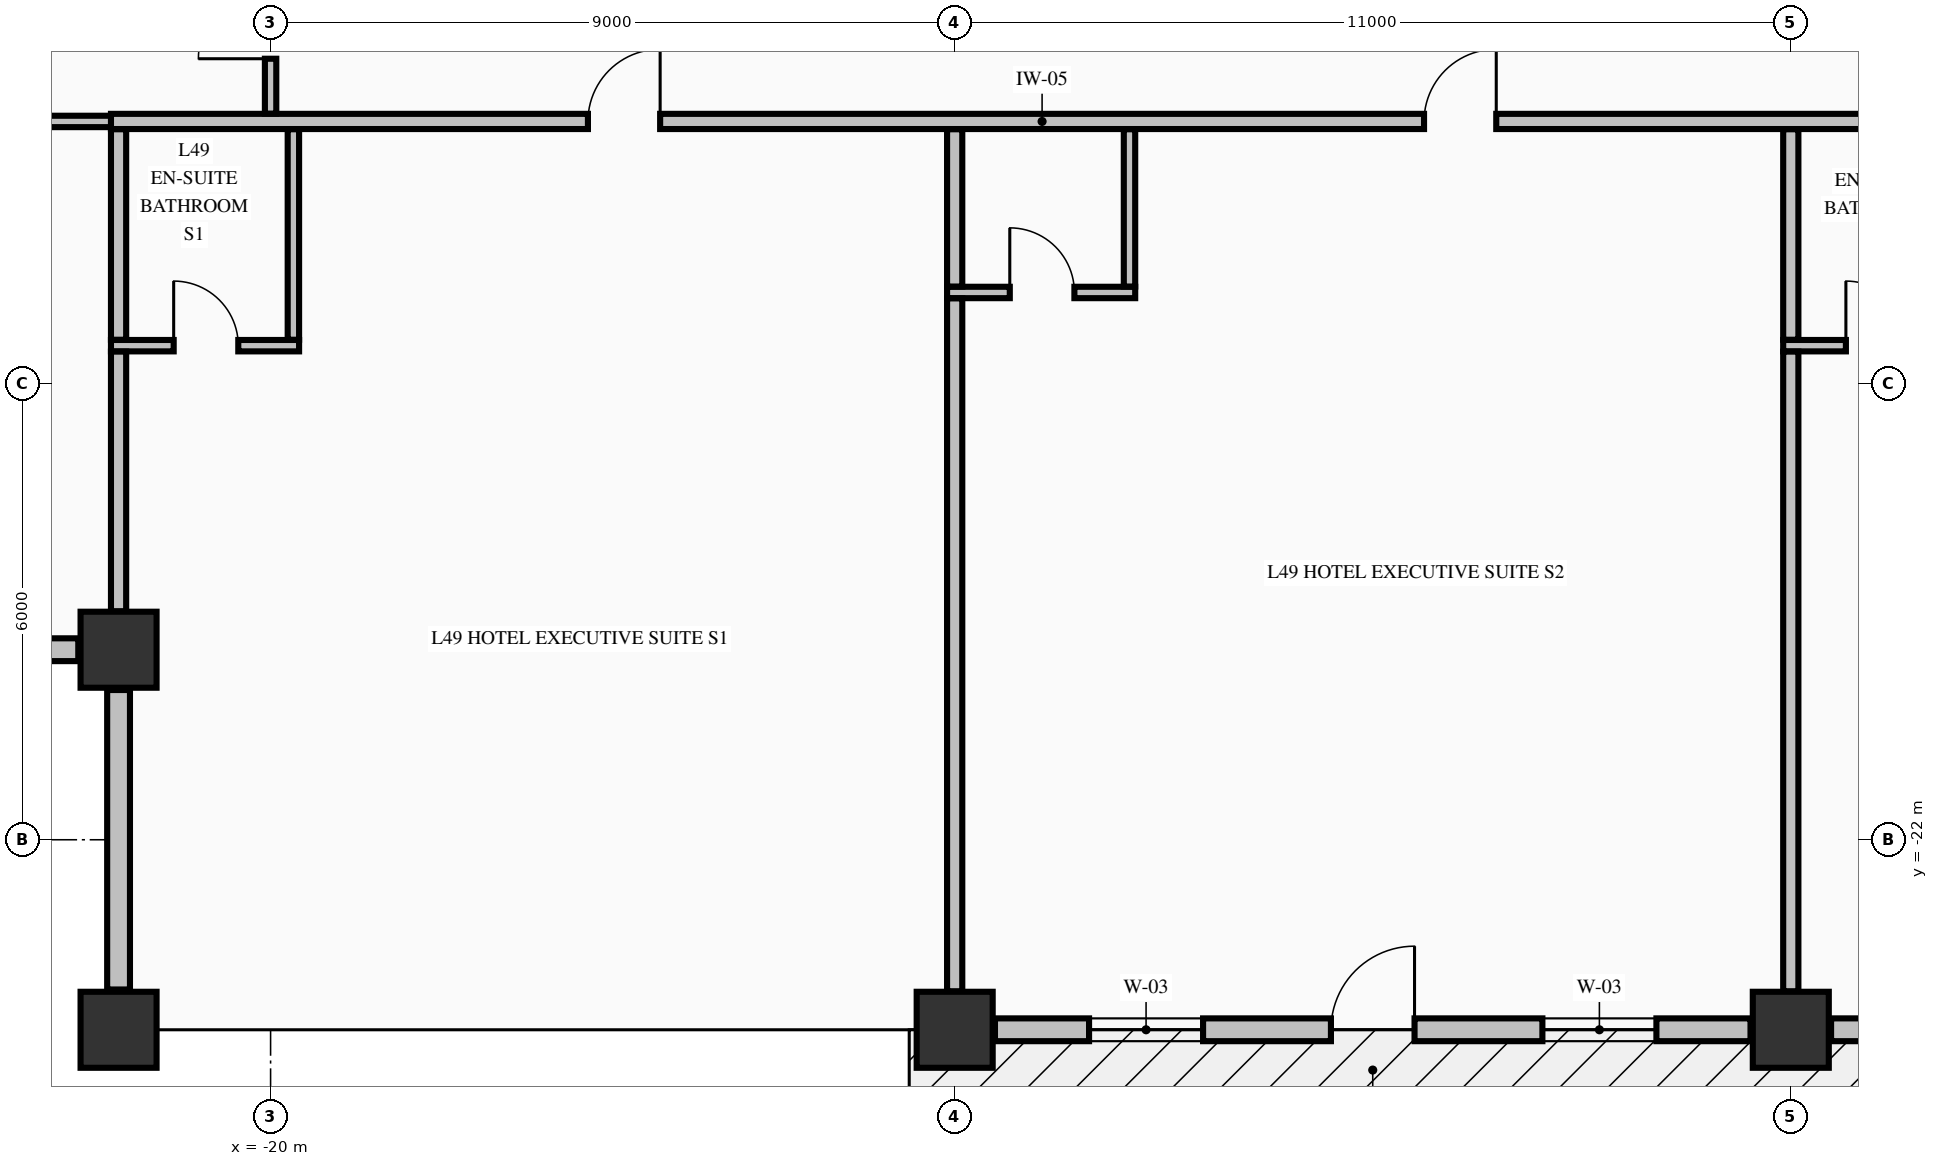
"""IFC4 building model, lengths in metres.
Left out: names, types, materials, properties, quantities, classifications, styles, units other than length and angle.
Written with IfcOpenShell. Run it as: python <this file> out.ifc"""

import sys

from ifc_helpers import new_model, si_unit, direction, frame, frame_2d, origin, origin_2d, place, context, subcontext, project, spatial, rectangle, extrude, element, fill, save


model = new_model("IFC4")
c1 = context("Model", 3, precision=1e-05, world=origin(), true_north=direction((0.0, 1.0)))
c2 = subcontext(c1, "Body", "Model", "MODEL_VIEW")
j1 = project(units=[si_unit("LENGTHUNIT", "METRE"), si_unit("PLANEANGLEUNIT", "RADIAN")], contexts=[c1])
p1 = place(None, origin())
s1 = spatial("IfcSite", under=j1, at=p1, CompositionType="ELEMENT")
p2 = place(p1, origin())
s2 = spatial("IfcBuilding", under=s1, at=p2, CompositionType="ELEMENT")
p3 = place(p2, frame((0.0, 0.0, 191.46)))
s3 = spatial("IfcBuildingStorey", under=s2, at=p3, CompositionType="ELEMENT", Elevation=191.46)
for number, where, z_axis, x_axis in (
    (1, (-22.0, -24.5, -0.425), (0.0, 0.0, 1.0), (1.0, 0.0, 0.0)),
    (2, (-11.0, -24.5, -0.425), (0.0, 0.0, 1.0), (1.0, 0.0, 0.0)),
    (3, (0.0, -24.5, -0.425), (0.0, 0.0, 1.0), (1.0, 0.0, 0.0)),
    (4, (-22.0, -19.5, -0.425), (0.0, 0.0, 1.0), (1.0, 0.0, 0.0)),
):
    element("IfcColumn", number, at=place(p3, frame(where, z_axis=z_axis, x_axis=x_axis)), inside=s3, PredefinedType="COLUMN", context=c2, shape_type="SweptSolid", body=[
        extrude(rectangle(XDim=1.0, YDim=1.0, at=origin_2d()), origin(), (0.0, 0.0, 1.0), 3.55),
    ])
for number, where, z_axis, x_axis in (
    (5, (-26.47, -19.5, 0.0), (0.0, 0.0, 1.0), (1.0, 0.0, 0.0)),
    (6, (-22.0, -20.03, 0.0), (0.0, 0.0, 1.0), (0.0, -1.0, 0.0)),
):
    element("IfcWall", number, at=place(p3, frame(where, z_axis=z_axis, x_axis=x_axis)), inside=s3, PredefinedType="STANDARD", context=c2, shape_type="SweptSolid", body=[
        extrude(rectangle(XDim=3.94, YDim=0.3, at=frame_2d((1.97, 0.0))), origin(), (0.0, 0.0, 1.0), 1.317),
    ])
p4 = place(p3, frame((-10.47, -24.5, 0.0), z_axis=(0.0, 0.0, 1.0), x_axis=(1.0, 0.0, 0.0)))
e7 = element("IfcWall", 7, at=p4, inside=s3, PredefinedType="STANDARD", context=c2, shape_type="SweptSolid", body=[
    extrude(rectangle(XDim=9.94, YDim=0.3, at=frame_2d((4.97, 0.0))), origin(), (0.0, 0.0, 1.0), 2.517),
])
p5 = place(p4, frame((4.42, 0.0, 0.0)))
e8 = element("IfcOpeningElement", 8, at=p5, cuts=e7, PredefinedType="OPENING", context=c2, shape_type="SweptSolid", body=[
    extrude(rectangle(XDim=1.1, YDim=2.15, at=frame_2d((0.55, 1.075))), frame((0.0, 0.16, 0.0), z_axis=(0.0, -1.0, 0.0), x_axis=(1.0, 0.0, 0.0)), (0.0, 0.0, 1.0), 0.32),
])
p6 = place(p4, frame((1.238, 0.0, 0.72)))
e9 = element("IfcOpeningElement", 9, at=p6, cuts=e7, PredefinedType="OPENING", context=c2, shape_type="SweptSolid", body=[
    extrude(rectangle(XDim=1.5, YDim=1.6, at=frame_2d((0.75, 0.8))), frame((0.0, 0.16, 0.0), z_axis=(0.0, -1.0, 0.0), x_axis=(1.0, 0.0, 0.0)), (0.0, 0.0, 1.0), 0.32),
])
p7 = place(p4, frame((7.202, 0.0, 0.72)))
e10 = element("IfcOpeningElement", 10, at=p7, cuts=e7, PredefinedType="OPENING", context=c2, shape_type="SweptSolid", body=[
    extrude(rectangle(XDim=1.5, YDim=1.6, at=frame_2d((0.75, 0.8))), frame((0.0, 0.16, 0.0), z_axis=(0.0, -1.0, 0.0), x_axis=(1.0, 0.0, 0.0)), (0.0, 0.0, 1.0), 0.32),
])
p8 = place(p3, frame((0.53, -24.5, 0.0), z_axis=(0.0, 0.0, 1.0), x_axis=(1.0, 0.0, 0.0)))
e11 = element("IfcWall", 11, at=p8, inside=s3, PredefinedType="STANDARD", context=c2, shape_type="SweptSolid", body=[
    extrude(rectangle(XDim=9.94, YDim=0.3, at=frame_2d((4.97, 0.0))), origin(), (0.0, 0.0, 1.0), 2.517),
])
p9 = place(p8, frame((1.238, 0.0, 0.72)))
e12 = element("IfcOpeningElement", 12, at=p9, cuts=e11, PredefinedType="OPENING", context=c2, shape_type="SweptSolid", body=[
    extrude(rectangle(XDim=1.5, YDim=1.6, at=frame_2d((0.75, 0.8))), frame((0.0, 0.16, 0.0), z_axis=(0.0, -1.0, 0.0), x_axis=(1.0, 0.0, 0.0)), (0.0, 0.0, 1.0), 0.32),
])
p10 = place(p8, frame((3.226, 0.0, 0.72)))
e13 = element("IfcOpeningElement", 13, at=p10, cuts=e11, PredefinedType="OPENING", context=c2, shape_type="SweptSolid", body=[
    extrude(rectangle(XDim=1.5, YDim=1.6, at=frame_2d((0.75, 0.8))), frame((0.0, 0.16, 0.0), z_axis=(0.0, -1.0, 0.0), x_axis=(1.0, 0.0, 0.0)), (0.0, 0.0, 1.0), 0.32),
])
p11 = place(p8, frame((5.214, 0.0, 0.72)))
e14 = element("IfcOpeningElement", 14, at=p11, cuts=e11, PredefinedType="OPENING", context=c2, shape_type="SweptSolid", body=[
    extrude(rectangle(XDim=1.5, YDim=1.6, at=frame_2d((0.75, 0.8))), frame((0.0, 0.16, 0.0), z_axis=(0.0, -1.0, 0.0), x_axis=(1.0, 0.0, 0.0)), (0.0, 0.0, 1.0), 0.32),
])
p12 = place(p3, frame((-22.1, -15.5, 0.0), z_axis=(0.0, 0.0, 1.0), x_axis=(1.0, 0.0, 0.0)))
e15 = element("IfcWall", 15, at=p12, inside=s3, PredefinedType="PARTITIONING", context=c2, shape_type="SweptSolid", body=[
    extrude(rectangle(XDim=2.475, YDim=0.15, at=frame_2d((1.238, 0.0))), origin(), (0.0, 0.0, 1.0), 3.125),
])
p13 = place(p12, frame((0.825, 0.0, 0.0)))
e16 = element("IfcOpeningElement", 16, at=p13, cuts=e15, PredefinedType="OPENING", context=c2, shape_type="SweptSolid", body=[
    extrude(rectangle(XDim=0.85, YDim=2.1, at=frame_2d((0.425, 1.05))), frame((0.0, 0.085, 0.0), z_axis=(0.0, -1.0, 0.0), x_axis=(1.0, 0.0, 0.0)), (0.0, 0.0, 1.0), 0.17),
])
p14 = place(p3, frame((-0.1, -15.5, 0.0), z_axis=(0.0, 0.0, 1.0), x_axis=(1.0, 0.0, 0.0)))
e17 = element("IfcWall", 17, at=p14, inside=s3, PredefinedType="PARTITIONING", context=c2, shape_type="SweptSolid", body=[
    extrude(rectangle(XDim=2.475, YDim=0.15, at=frame_2d((1.238, 0.0))), origin(), (0.0, 0.0, 1.0), 3.125),
])
p15 = place(p14, frame((0.825, 0.0, 0.0)))
e18 = element("IfcOpeningElement", 18, at=p15, cuts=e17, PredefinedType="OPENING", context=c2, shape_type="SweptSolid", body=[
    extrude(rectangle(XDim=0.85, YDim=2.1, at=frame_2d((0.425, 1.05))), frame((0.0, 0.085, 0.0), z_axis=(0.0, -1.0, 0.0), x_axis=(1.0, 0.0, 0.0)), (0.0, 0.0, 1.0), 0.17),
])
p16 = place(p3, frame((-11.1, -14.8, 0.0), z_axis=(0.0, 0.0, 1.0), x_axis=(1.0, 0.0, 0.0)))
e19 = element("IfcWall", 19, at=p16, inside=s3, PredefinedType="PARTITIONING", context=c2, shape_type="SweptSolid", body=[
    extrude(rectangle(XDim=2.475, YDim=0.15, at=frame_2d((1.238, 0.0))), origin(), (0.0, 0.0, 1.0), 3.125),
])
p17 = place(p16, frame((0.825, 0.0, 0.0)))
e20 = element("IfcOpeningElement", 20, at=p17, cuts=e19, PredefinedType="OPENING", context=c2, shape_type="SweptSolid", body=[
    extrude(rectangle(XDim=0.85, YDim=2.1, at=frame_2d((0.425, 1.05))), frame((0.0, 0.085, 0.0), z_axis=(0.0, -1.0, 0.0), x_axis=(1.0, 0.0, 0.0)), (0.0, 0.0, 1.0), 0.17),
])
p18 = place(p3, frame((-26.835, -12.55, 0.0), z_axis=(0.0, 0.0, 1.0), x_axis=(1.0, 0.0, 0.0)))
e21 = element("IfcWall", 21, at=p18, inside=s3, PredefinedType="PARTITIONING", context=c2, shape_type="SweptSolid", body=[
    extrude(rectangle(XDim=4.935, YDim=0.15, at=frame_2d((2.468, 0.0))), origin(), (0.0, 0.0, 1.0), 3.125),
])
p19 = place(p3, frame((-22.1, -12.55, 0.0), z_axis=(0.0, 0.0, 1.0), x_axis=(1.0, 0.0, 0.0)))
e22 = element("IfcWall", 22, at=p19, inside=s3, PredefinedType="PARTITIONING", context=c2, shape_type="SweptSolid", body=[
    extrude(rectangle(XDim=39.2, YDim=0.2, at=frame_2d((19.6, 0.0))), origin(), (0.0, 0.0, 1.0), 3.125),
])
p20 = place(p19, frame((6.275, 0.0, 0.0)))
e23 = element("IfcOpeningElement", 23, at=p20, cuts=e22, PredefinedType="OPENING", context=c2, shape_type="SweptSolid", body=[
    extrude(rectangle(XDim=0.95, YDim=2.15, at=frame_2d((0.475, 1.075))), frame((0.0, 0.11, 0.0), z_axis=(0.0, -1.0, 0.0), x_axis=(1.0, 0.0, 0.0)), (0.0, 0.0, 1.0), 0.22),
])
p21 = place(p19, frame((17.275, 0.0, 0.0)))
e24 = element("IfcOpeningElement", 24, at=p21, cuts=e22, PredefinedType="OPENING", context=c2, shape_type="SweptSolid", body=[
    extrude(rectangle(XDim=0.95, YDim=2.15, at=frame_2d((0.475, 1.075))), frame((0.0, 0.11, 0.0), z_axis=(0.0, -1.0, 0.0), x_axis=(1.0, 0.0, 0.0)), (0.0, 0.0, 1.0), 0.22),
])
p22 = place(p19, frame((27.025, 0.0, 0.0)))
e25 = element("IfcOpeningElement", 25, at=p22, cuts=e22, PredefinedType="OPENING", context=c2, shape_type="SweptSolid", body=[
    extrude(rectangle(XDim=0.95, YDim=2.15, at=frame_2d((0.475, 1.075))), frame((0.0, 0.11, 0.0), z_axis=(0.0, -1.0, 0.0), x_axis=(1.0, 0.0, 0.0)), (0.0, 0.0, 1.0), 0.22),
])
p23 = place(p19, frame((35.525, 0.0, 0.0)))
e26 = element("IfcOpeningElement", 26, at=p23, cuts=e22, PredefinedType="OPENING", context=c2, shape_type="SweptSolid", body=[
    extrude(rectangle(XDim=0.95, YDim=2.15, at=frame_2d((0.475, 1.075))), frame((0.0, 0.11, 0.0), z_axis=(0.0, -1.0, 0.0), x_axis=(1.0, 0.0, 0.0)), (0.0, 0.0, 1.0), 0.22),
])
p24 = place(p3, frame((-22.0, -18.994, 0.0), z_axis=(0.0, 0.0, 1.0), x_axis=(0.0, 1.0, 0.0)))
e27 = element("IfcWall", 27, at=p24, inside=s3, PredefinedType="PARTITIONING", context=c2, shape_type="SweptSolid", body=[
    extrude(rectangle(XDim=3.416, YDim=0.2, at=frame_2d((1.708, 0.0))), origin(), (0.0, 0.0, 1.0), 3.125),
])
p25 = place(p3, frame((-22.0, -15.422, 0.0), z_axis=(0.0, 0.0, 1.0), x_axis=(0.0, 1.0, 0.0)))
e28 = element("IfcWall", 28, at=p25, inside=s3, PredefinedType="PARTITIONING", context=c2, shape_type="SweptSolid", body=[
    extrude(rectangle(XDim=2.769, YDim=0.2, at=frame_2d((1.385, 0.0))), origin(), (0.0, 0.0, 1.0), 3.125),
])
p26 = place(p3, frame((-20.0, -12.447, 0.0), z_axis=(0.0, 0.0, 1.0), x_axis=(0.0, 1.0, 0.0)))
e29 = element("IfcWall", 29, at=p26, inside=s3, PredefinedType="PARTITIONING", context=c2, shape_type="SweptSolid", body=[
    extrude(rectangle(XDim=2.066, YDim=0.15, at=frame_2d((1.033, 0.0))), origin(), (0.0, 0.0, 1.0), 2.317),
])
p27 = place(p26, frame((0.722, 0.0, 0.0)))
e30 = element("IfcOpeningElement", 30, at=p27, cuts=e29, PredefinedType="OPENING", context=c2, shape_type="SweptSolid", body=[
    extrude(rectangle(XDim=0.95, YDim=2.15, at=frame_2d((0.475, 1.075))), frame((0.0, 0.085, 0.0), z_axis=(0.0, -1.0, 0.0), x_axis=(1.0, 0.0, 0.0)), (0.0, 0.0, 1.0), 0.17),
])
p28 = place(p3, frame((-19.7, -15.422, 0.0), z_axis=(0.0, 0.0, 1.0), x_axis=(0.0, 1.0, 0.0)))
e31 = element("IfcWall", 31, at=p28, inside=s3, PredefinedType="PARTITIONING", context=c2, shape_type="SweptSolid", body=[
    extrude(rectangle(XDim=2.769, YDim=0.15, at=frame_2d((1.385, 0.0))), origin(), (0.0, 0.0, 1.0), 2.317),
])
p29 = place(p3, frame((-11.0, -23.994, 0.0), z_axis=(0.0, 0.0, 1.0), x_axis=(0.0, 1.0, 0.0)))
e32 = element("IfcWall", 32, at=p29, inside=s3, PredefinedType="PARTITIONING", context=c2, shape_type="SweptSolid", body=[
    extrude(rectangle(XDim=9.116, YDim=0.2, at=frame_2d((4.558, 0.0))), origin(), (0.0, 0.0, 1.0), 2.317),
])
p30 = place(p3, frame((-11.0, -14.722, 0.0), z_axis=(0.0, 0.0, 1.0), x_axis=(0.0, 1.0, 0.0)))
e33 = element("IfcWall", 33, at=p30, inside=s3, PredefinedType="PARTITIONING", context=c2, shape_type="SweptSolid", body=[
    extrude(rectangle(XDim=2.069, YDim=0.2, at=frame_2d((1.034, 0.0))), origin(), (0.0, 0.0, 1.0), 2.317),
])
p31 = place(p3, frame((-8.7, -14.722, 0.0), z_axis=(0.0, 0.0, 1.0), x_axis=(0.0, 1.0, 0.0)))
e34 = element("IfcWall", 34, at=p31, inside=s3, PredefinedType="PARTITIONING", context=c2, shape_type="SweptSolid", body=[
    extrude(rectangle(XDim=2.069, YDim=0.15, at=frame_2d((1.034, 0.0))), origin(), (0.0, 0.0, 1.0), 3.125),
])
p32 = place(p3, frame((0.0, -23.994, 0.0), z_axis=(0.0, 0.0, 1.0), x_axis=(0.0, 1.0, 0.0)))
e35 = element("IfcWall", 35, at=p32, inside=s3, PredefinedType="PARTITIONING", context=c2, shape_type="SweptSolid", body=[
    extrude(rectangle(XDim=8.416, YDim=0.2, at=frame_2d((4.208, 0.0))), origin(), (0.0, 0.0, 1.0), 2.317),
])
p33 = place(p3, frame((0.0, -15.422, 0.0), z_axis=(0.0, 0.0, 1.0), x_axis=(0.0, 1.0, 0.0)))
e36 = element("IfcWall", 36, at=p33, inside=s3, PredefinedType="PARTITIONING", context=c2, shape_type="SweptSolid", body=[
    extrude(rectangle(XDim=2.769, YDim=0.2, at=frame_2d((1.385, 0.0))), origin(), (0.0, 0.0, 1.0), 2.317),
])
p34 = place(p5, origin())
e37 = element("IfcDoor", 37, at=p34, inside=s3, OperationType="SINGLE_SWING_RIGHT", PredefinedType="DOOR", context=c2, shape_type="SweptSolid", body=[
    extrude(rectangle(XDim=1.1, YDim=2.15, at=frame_2d((0.55, 1.075))), frame((0.0, 0.025, 0.0), z_axis=(0.0, -1.0, 0.0), x_axis=(1.0, 0.0, 0.0)), (0.0, 0.0, 1.0), 0.05),
])
fill(e8, e37)
p35 = place(p6, origin())
e38 = element("IfcWindow", 38, at=p35, inside=s3, PartitioningType="SINGLE_PANEL", PredefinedType="WINDOW", context=c2, shape_type="SweptSolid", body=[
    extrude(rectangle(XDim=1.5, YDim=1.6, at=frame_2d((0.75, 0.8))), frame((0.0, 0.03, 0.0), z_axis=(0.0, -1.0, 0.0), x_axis=(1.0, 0.0, 0.0)), (0.0, 0.0, 1.0), 0.06),
])
fill(e9, e38)
p36 = place(p7, origin())
e39 = element("IfcWindow", 39, at=p36, inside=s3, PartitioningType="SINGLE_PANEL", PredefinedType="WINDOW", context=c2, shape_type="SweptSolid", body=[
    extrude(rectangle(XDim=1.5, YDim=1.6, at=frame_2d((0.75, 0.8))), frame((0.0, 0.03, 0.0), z_axis=(0.0, -1.0, 0.0), x_axis=(1.0, 0.0, 0.0)), (0.0, 0.0, 1.0), 0.06),
])
fill(e10, e39)
p37 = place(p20, origin())
e40 = element("IfcDoor", 40, at=p37, inside=s3, OperationType="SINGLE_SWING_RIGHT", PredefinedType="DOOR", context=c2, shape_type="SweptSolid", body=[
    extrude(rectangle(XDim=0.95, YDim=2.15, at=frame_2d((0.475, 1.075))), frame((0.0, 0.025, 0.0), z_axis=(0.0, -1.0, 0.0), x_axis=(1.0, 0.0, 0.0)), (0.0, 0.0, 1.0), 0.05),
])
fill(e23, e40)
p38 = place(p13, origin())
e41 = element("IfcDoor", 41, at=p38, inside=s3, OperationType="SINGLE_SWING_LEFT", PredefinedType="DOOR", context=c2, shape_type="SweptSolid", body=[
    extrude(rectangle(XDim=0.85, YDim=2.1, at=frame_2d((0.425, 1.05))), frame((0.0, 0.025, 0.0), z_axis=(0.0, -1.0, 0.0), x_axis=(1.0, 0.0, 0.0)), (0.0, 0.0, 1.0), 0.05),
])
fill(e16, e41)
p39 = place(p21, origin())
e42 = element("IfcDoor", 42, at=p39, inside=s3, OperationType="SINGLE_SWING_RIGHT", PredefinedType="DOOR", context=c2, shape_type="SweptSolid", body=[
    extrude(rectangle(XDim=0.95, YDim=2.15, at=frame_2d((0.475, 1.075))), frame((0.0, 0.025, 0.0), z_axis=(0.0, -1.0, 0.0), x_axis=(1.0, 0.0, 0.0)), (0.0, 0.0, 1.0), 0.05),
])
fill(e24, e42)
p40 = place(p17, origin())
e43 = element("IfcDoor", 43, at=p40, inside=s3, OperationType="SINGLE_SWING_LEFT", PredefinedType="DOOR", context=c2, shape_type="SweptSolid", body=[
    extrude(rectangle(XDim=0.85, YDim=2.1, at=frame_2d((0.425, 1.05))), frame((0.0, 0.025, 0.0), z_axis=(0.0, -1.0, 0.0), x_axis=(1.0, 0.0, 0.0)), (0.0, 0.0, 1.0), 0.05),
])
fill(e20, e43)
p41 = place(p15, origin())
e44 = element("IfcDoor", 44, at=p41, inside=s3, OperationType="SINGLE_SWING_LEFT", PredefinedType="DOOR", context=c2, shape_type="SweptSolid", body=[
    extrude(rectangle(XDim=0.85, YDim=2.1, at=frame_2d((0.425, 1.05))), frame((0.0, 0.025, 0.0), z_axis=(0.0, -1.0, 0.0), x_axis=(1.0, 0.0, 0.0)), (0.0, 0.0, 1.0), 0.05),
])
fill(e18, e44)
p42 = place(p27, origin())
e45 = element("IfcDoor", 45, at=p42, inside=s3, OperationType="SINGLE_SWING_LEFT", PredefinedType="DOOR", context=c2, shape_type="SweptSolid", body=[
    extrude(rectangle(XDim=0.95, YDim=2.15, at=frame_2d((0.475, 1.075))), frame((0.0, 0.025, 0.0), z_axis=(0.0, -1.0, 0.0), x_axis=(1.0, 0.0, 0.0)), (0.0, 0.0, 1.0), 0.05),
])
fill(e30, e45)
save(model, sys.argv[1])
